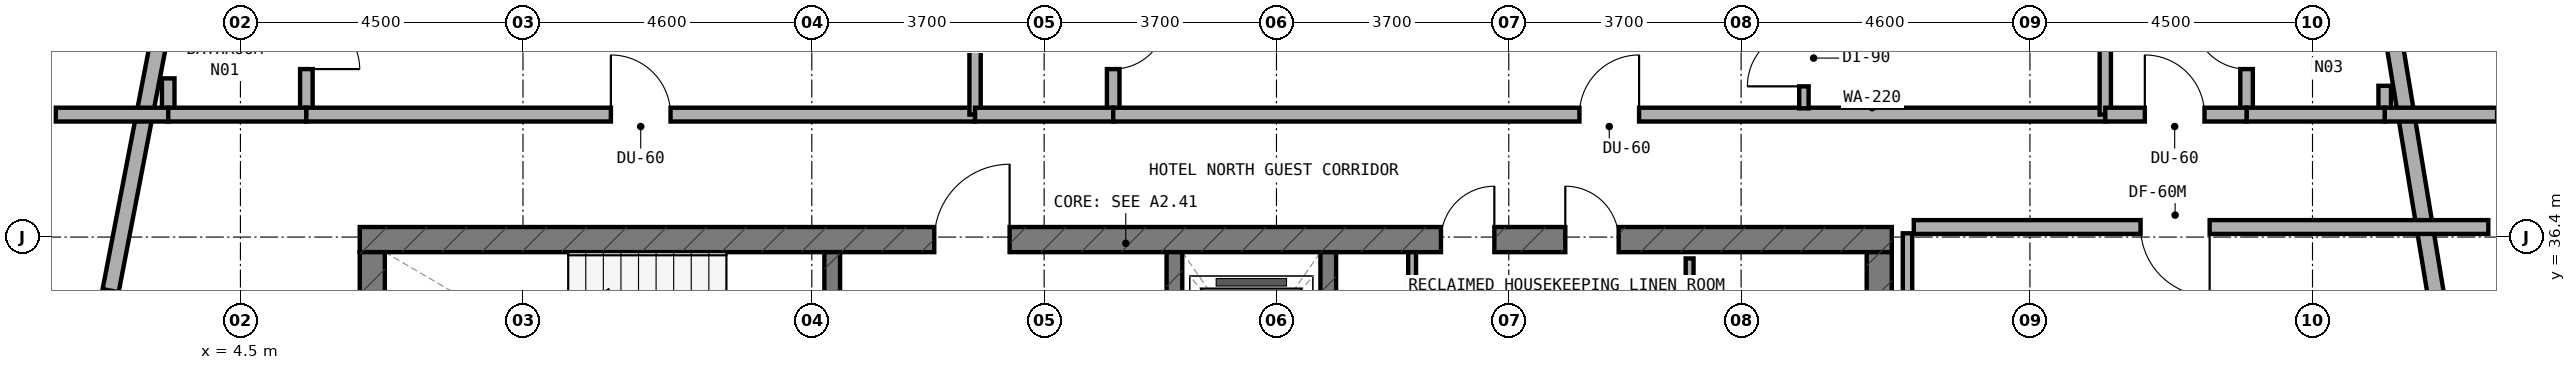
"""IFC4 building model, lengths in metres.
Left out: names, types, materials, properties, quantities, classifications, styles, units other than length and angle.
Written with IfcOpenShell. Run it as: python <this file> out.ifc"""

import sys

from ifc_helpers import new_model, si_unit, direction, frame, frame_2d, origin, place, context, subcontext, project, spatial, rectangle, extrude, element, fill, save


model = new_model("IFC4")
c1 = context("Model", 3, precision=1e-05, world=origin(), true_north=direction((0.0, 1.0)))
c2 = subcontext(c1, "Body", "Model", "MODEL_VIEW")
j1 = project(units=[si_unit("LENGTHUNIT", "METRE"), si_unit("PLANEANGLEUNIT", "RADIAN")], contexts=[c1])
p1 = place(None, origin())
s1 = spatial("IfcSite", under=j1, at=p1, CompositionType="ELEMENT")
p2 = place(p1, origin())
s2 = spatial("IfcBuilding", under=s1, at=p2, CompositionType="ELEMENT")
p3 = place(p2, frame((0.0, 0.0, 181.1)))
s3 = spatial("IfcBuildingStorey", under=s2, at=p3, CompositionType="ELEMENT", Elevation=181.1)
p4 = place(p3, frame((6.4, 36.36, 0.0), z_axis=(0.0, 0.0, 1.0), x_axis=(1.0, 0.0, 0.0)))
e1 = element("IfcWall", 1, at=p4, inside=s3, PredefinedType="SHEAR", context=c2, shape_type="SweptSolid", body=[
    extrude(rectangle(XDim=24.4, YDim=0.4, at=frame_2d((12.2, 0.0))), origin(), (0.0, 0.0, 1.0), 3.6),
])
p5 = place(p4, frame((9.15, 0.0, 0.0)))
e2 = element("IfcOpeningElement", 2, at=p5, cuts=e1, PredefinedType="OPENING", context=c2, shape_type="SweptSolid", body=[
    extrude(rectangle(XDim=1.2, YDim=2.15, at=frame_2d((0.6, 1.075))), frame((0.0, 0.21, 0.0), z_axis=(0.0, -1.0, 0.0), x_axis=(1.0, 0.0, 0.0)), (0.0, 0.0, 1.0), 0.42),
])
p6 = place(p4, frame((19.2, 0.0, 0.0)))
e3 = element("IfcOpeningElement", 3, at=p6, cuts=e1, PredefinedType="OPENING", context=c2, shape_type="SweptSolid", body=[
    extrude(rectangle(XDim=0.85, YDim=2.1, at=frame_2d((0.425, 1.05))), frame((0.0, 0.21, 0.0), z_axis=(0.0, -1.0, 0.0), x_axis=(1.0, 0.0, 0.0)), (0.0, 0.0, 1.0), 0.42),
])
p7 = place(p4, frame((17.22, 0.0, 0.0)))
e4 = element("IfcOpeningElement", 4, at=p7, cuts=e1, PredefinedType="OPENING", context=c2, shape_type="SweptSolid", body=[
    extrude(rectangle(XDim=0.85, YDim=2.1, at=frame_2d((0.425, 1.05))), frame((0.0, 0.21, 0.0), z_axis=(0.0, -1.0, 0.0), x_axis=(1.0, 0.0, 0.0)), (0.0, 0.0, 1.0), 0.42),
])
for number, where, z_axis, x_axis in (
    (5, (6.6, 33.0, 0.0), (0.0, 0.0, 1.0), (0.0, 1.0, 0.0)),
    (6, (30.6, 33.0, 0.0), (0.0, 0.0, 1.0), (0.0, 1.0, 0.0)),
):
    element("IfcWall", number, at=place(p3, frame(where, z_axis=z_axis, x_axis=x_axis)), inside=s3, PredefinedType="SHEAR", context=c2, shape_type="SweptSolid", body=[
        extrude(rectangle(XDim=3.16, YDim=0.4, at=frame_2d((1.58, 0.0))), origin(), (0.0, 0.0, 1.0), 3.6),
    ])
p8 = place(p3, frame((13.925, 33.0, 0.0), z_axis=(0.0, 0.0, 1.0), x_axis=(0.0, 1.0, 0.0)))
e7 = element("IfcWall", 7, at=p8, inside=s3, PredefinedType="STANDARD", context=c2, shape_type="SweptSolid", body=[
    extrude(rectangle(XDim=3.16, YDim=0.25, at=frame_2d((1.58, 0.0))), origin(), (0.0, 0.0, 1.0), 3.32),
])
p9 = place(p8, frame((0.98, 0.0, 0.0)))
e8 = element("IfcOpeningElement", 8, at=p9, cuts=e7, PredefinedType="OPENING", context=c2, shape_type="SweptSolid", body=[
    extrude(rectangle(XDim=1.1, YDim=2.15, at=frame_2d((0.55, 1.075))), frame((0.0, 0.135, 0.0), z_axis=(0.0, -1.0, 0.0), x_axis=(1.0, 0.0, 0.0)), (0.0, 0.0, 1.0), 0.27),
])
p10 = place(p3, frame((19.375, 33.0, 0.0), z_axis=(0.0, 0.0, 1.0), x_axis=(0.0, 1.0, 0.0)))
e9 = element("IfcWall", 9, at=p10, inside=s3, PredefinedType="STANDARD", context=c2, shape_type="SweptSolid", body=[
    extrude(rectangle(XDim=3.16, YDim=0.25, at=frame_2d((1.58, 0.0))), origin(), (0.0, 0.0, 1.0), 3.32),
])
p11 = place(p10, frame((0.98, 0.0, 0.0)))
e10 = element("IfcOpeningElement", 10, at=p11, cuts=e9, PredefinedType="OPENING", context=c2, shape_type="SweptSolid", body=[
    extrude(rectangle(XDim=1.1, YDim=2.15, at=frame_2d((0.55, 1.075))), frame((0.0, 0.135, 0.0), z_axis=(0.0, -1.0, 0.0), x_axis=(1.0, 0.0, 0.0)), (0.0, 0.0, 1.0), 0.27),
])
p12 = place(p3, frame((21.825, 33.0, 0.0), z_axis=(0.0, 0.0, 1.0), x_axis=(0.0, 1.0, 0.0)))
e11 = element("IfcWall", 11, at=p12, inside=s3, PredefinedType="STANDARD", context=c2, shape_type="SweptSolid", body=[
    extrude(rectangle(XDim=3.16, YDim=0.25, at=frame_2d((1.58, 0.0))), origin(), (0.0, 0.0, 1.0), 3.32),
])
p13 = place(p3, frame((40.476, 29.354, 0.0), z_axis=(0.0, 0.0, 1.0), x_axis=(-0.162811037825, 0.986657268742, 0.0)))
e12 = element("IfcWall", 12, at=p13, inside=s3, PredefinedType="STANDARD", context=c2, shape_type="SweptSolid", body=[
    extrude(rectangle(XDim=10.473, YDim=0.26, at=frame_2d((5.236, 0.0))), origin(), (0.0, 0.0, 1.0), 3.32),
])
p14 = place(p13, frame((2.545, 0.0, 0.85)))
e13 = element("IfcOpeningElement", 13, at=p14, cuts=e12, PredefinedType="OPENING", context=c2, shape_type="SweptSolid", body=[
    extrude(rectangle(XDim=2.1, YDim=1.5, at=frame_2d((1.05, 0.75))), frame((0.0, 0.14, 0.0), z_axis=(0.0, -1.0, 0.0), x_axis=(1.0, 0.0, 0.0)), (0.0, 0.0, 1.0), 0.28),
])
p15 = place(p3, frame((3.23, 39.683, 0.0), z_axis=(0.0, 0.0, 1.0), x_axis=(-0.189254809039, -0.98192801022, 0.0)))
e14 = element("IfcWall", 14, at=p15, inside=s3, PredefinedType="STANDARD", context=c2, shape_type="SweptSolid", body=[
    extrude(rectangle(XDim=9.046, YDim=0.26, at=frame_2d((4.523, 0.0))), origin(), (0.0, 0.0, 1.0), 3.32),
])
p16 = place(p15, frame((4.212, 0.0, 0.85)))
e15 = element("IfcOpeningElement", 15, at=p16, cuts=e14, PredefinedType="OPENING", context=c2, shape_type="SweptSolid", body=[
    extrude(rectangle(XDim=2.1, YDim=1.5, at=frame_2d((1.05, 0.75))), frame((0.0, 0.14, 0.0), z_axis=(0.0, -1.0, 0.0), x_axis=(1.0, 0.0, 0.0)), (0.0, 0.0, 1.0), 0.28),
])
p17 = place(p3, frame((27.58, 33.1, 0.0), z_axis=(0.0, 0.0, 1.0), x_axis=(0.0, 1.0, 0.0)))
e16 = element("IfcWall", 16, at=p17, inside=s3, PredefinedType="PARTITIONING", context=c2, shape_type="SweptSolid", body=[
    extrude(rectangle(XDim=2.96, YDim=0.125, at=frame_2d((1.48, 0.0))), origin(), (0.0, 0.0, 1.0), 2.995),
])
p18 = place(p17, frame((1.055, 0.0, 0.0)))
e17 = element("IfcOpeningElement", 17, at=p18, cuts=e16, PredefinedType="OPENING", context=c2, shape_type="SweptSolid", body=[
    extrude(rectangle(XDim=0.85, YDim=2.1, at=frame_2d((0.425, 1.05))), frame((0.0, 0.073, 0.0), z_axis=(0.0, -1.0, 0.0), x_axis=(1.0, 0.0, 0.0)), (0.0, 0.0, 1.0), 0.145),
])
p19 = place(p3, frame((23.16, 34.82, 0.0), z_axis=(0.0, 0.0, 1.0), x_axis=(0.0, 1.0, 0.0)))
e18 = element("IfcWall", 18, at=p19, inside=s3, PredefinedType="PARTITIONING", context=c2, shape_type="SweptSolid", body=[
    extrude(rectangle(XDim=1.34, YDim=0.125, at=frame_2d((0.67, 0.0))), origin(), (0.0, 0.0, 1.0), 3.32),
])
p20 = place(p3, frame((5.55, 38.45, 0.0), z_axis=(0.0, 0.0, 1.0), x_axis=(0.0, 1.0, 0.0)))
e19 = element("IfcWall", 19, at=p20, inside=s3, PredefinedType="PLUMBINGWALL", context=c2, shape_type="SweptSolid", body=[
    extrude(rectangle(XDim=2.1, YDim=0.2, at=frame_2d((1.05, 0.0))), origin(), (0.0, 0.0, 1.0), 3.32),
])
p21 = place(p20, frame((0.625, 0.0, 0.0)))
e20 = element("IfcOpeningElement", 20, at=p21, cuts=e19, PredefinedType="OPENING", context=c2, shape_type="SweptSolid", body=[
    extrude(rectangle(XDim=0.85, YDim=2.1, at=frame_2d((0.425, 1.05))), frame((0.0, 0.11, 0.0), z_axis=(0.0, -1.0, 0.0), x_axis=(1.0, 0.0, 0.0)), (0.0, 0.0, 1.0), 0.22),
])
p22 = place(p3, frame((3.35, 38.35, 0.0), z_axis=(0.0, 0.0, 1.0), x_axis=(0.0, 1.0, 0.0)))
e21 = element("IfcWall", 21, at=p22, inside=s3, PredefinedType="PLUMBINGWALL", context=c2, shape_type="SweptSolid", body=[
    extrude(rectangle(XDim=0.577, YDim=0.2, at=frame_2d((0.289, 0.0))), origin(), (0.0, 0.0, 1.0), 3.32),
])
p23 = place(p3, frame((1.56, 38.35, 0.0), z_axis=(0.0, 0.0, 1.0), x_axis=(1.0, 0.0, 0.0)))
e22 = element("IfcWall", 22, at=p23, inside=s3, PredefinedType="SOLIDWALL", context=c2, shape_type="SweptSolid", body=[
    extrude(rectangle(XDim=1.79, YDim=0.22, at=frame_2d((0.895, 0.0))), origin(), (0.0, 0.0, 1.0), 3.32),
])
p24 = place(p3, frame((3.35, 38.35, 0.0), z_axis=(0.0, 0.0, 1.0), x_axis=(1.0, 0.0, 0.0)))
e23 = element("IfcWall", 23, at=p24, inside=s3, PredefinedType="SOLIDWALL", context=c2, shape_type="SweptSolid", body=[
    extrude(rectangle(XDim=2.2, YDim=0.22, at=frame_2d((1.1, 0.0))), origin(), (0.0, 0.0, 1.0), 3.32),
])
p25 = place(p3, frame((5.55, 38.35, 0.0), z_axis=(0.0, 0.0, 1.0), x_axis=(1.0, 0.0, 0.0)))
e24 = element("IfcWall", 24, at=p25, inside=s3, PredefinedType="SOLIDWALL", context=c2, shape_type="SweptSolid", body=[
    extrude(rectangle(XDim=10.65, YDim=0.22, at=frame_2d((5.325, 0.0))), origin(), (0.0, 0.0, 1.0), 2.995),
])
p26 = place(p25, frame((4.85, 0.0, 0.0)))
e25 = element("IfcOpeningElement", 25, at=p26, cuts=e24, PredefinedType="OPENING", context=c2, shape_type="SweptSolid", body=[
    extrude(rectangle(XDim=0.95, YDim=2.1, at=frame_2d((0.475, 1.05))), frame((0.0, 0.12, 0.0), z_axis=(0.0, -1.0, 0.0), x_axis=(1.0, 0.0, 0.0)), (0.0, 0.0, 1.0), 0.24),
])
p27 = place(p3, frame((16.2, 38.35, 0.0), z_axis=(0.0, 0.0, 1.0), x_axis=(0.0, 1.0, 0.0)))
e26 = element("IfcWall", 26, at=p27, inside=s3, PredefinedType="SOLIDWALL", context=c2, shape_type="SweptSolid", body=[
    extrude(rectangle(XDim=6.19, YDim=0.18, at=frame_2d((3.095, 0.0))), origin(), (0.0, 0.0, 1.0), 2.935),
])
p28 = place(p3, frame((18.4, 38.45, 0.0), z_axis=(0.0, 0.0, 1.0), x_axis=(0.0, 1.0, 0.0)))
e27 = element("IfcWall", 27, at=p28, inside=s3, PredefinedType="PLUMBINGWALL", context=c2, shape_type="SweptSolid", body=[
    extrude(rectangle(XDim=2.1, YDim=0.2, at=frame_2d((1.05, 0.0))), origin(), (0.0, 0.0, 1.0), 2.895),
])
p29 = place(p28, frame((0.625, 0.0, 0.0)))
e28 = element("IfcOpeningElement", 28, at=p29, cuts=e27, PredefinedType="OPENING", context=c2, shape_type="SweptSolid", body=[
    extrude(rectangle(XDim=0.85, YDim=2.1, at=frame_2d((0.425, 1.05))), frame((0.0, 0.11, 0.0), z_axis=(0.0, -1.0, 0.0), x_axis=(1.0, 0.0, 0.0)), (0.0, 0.0, 1.0), 0.22),
])
p30 = place(p3, frame((16.2, 38.35, 0.0), z_axis=(0.0, 0.0, 1.0), x_axis=(1.0, 0.0, 0.0)))
e29 = element("IfcWall", 29, at=p30, inside=s3, PredefinedType="SOLIDWALL", context=c2, shape_type="SweptSolid", body=[
    extrude(rectangle(XDim=2.2, YDim=0.22, at=frame_2d((1.1, 0.0))), origin(), (0.0, 0.0, 1.0), 2.995),
])
p31 = place(p3, frame((18.4, 38.35, 0.0), z_axis=(0.0, 0.0, 1.0), x_axis=(1.0, 0.0, 0.0)))
e30 = element("IfcWall", 30, at=p31, inside=s3, PredefinedType="SOLIDWALL", context=c2, shape_type="SweptSolid", body=[
    extrude(rectangle(XDim=15.8, YDim=0.22, at=frame_2d((7.9, 0.0))), origin(), (0.0, 0.0, 1.0), 2.995),
])
p32 = place(p31, frame((7.425, 0.0, 0.0)))
e31 = element("IfcOpeningElement", 31, at=p32, cuts=e30, PredefinedType="OPENING", context=c2, shape_type="SweptSolid", body=[
    extrude(rectangle(XDim=0.95, YDim=2.1, at=frame_2d((0.475, 1.05))), frame((0.0, 0.12, 0.0), z_axis=(0.0, -1.0, 0.0), x_axis=(1.0, 0.0, 0.0)), (0.0, 0.0, 1.0), 0.24),
])
p33 = place(p3, frame((29.4, 38.45, 0.0), z_axis=(0.0, 0.0, 1.0), x_axis=(0.0, 1.0, 0.0)))
e32 = element("IfcWall", 32, at=p33, inside=s3, PredefinedType="PARTITIONING", context=c2, shape_type="SweptSolid", body=[
    extrude(rectangle(XDim=5.503, YDim=0.15, at=frame_2d((2.751, 0.0))), origin(), (0.0, 0.0, 1.0), 2.895),
])
p34 = place(p33, frame((0.35, 0.0, 0.0)))
e33 = element("IfcOpeningElement", 33, at=p34, cuts=e32, PredefinedType="OPENING", context=c2, shape_type="SweptSolid", body=[
    extrude(rectangle(XDim=0.9, YDim=2.1, at=frame_2d((0.45, 1.05))), frame((0.0, 0.085, 0.0), z_axis=(0.0, -1.0, 0.0), x_axis=(1.0, 0.0, 0.0)), (0.0, 0.0, 1.0), 0.17),
])
p35 = place(p3, frame((34.2, 38.35, 0.0), z_axis=(0.0, 0.0, 1.0), x_axis=(0.0, 1.0, 0.0)))
e34 = element("IfcWall", 34, at=p35, inside=s3, PredefinedType="SOLIDWALL", context=c2, shape_type="SweptSolid", body=[
    extrude(rectangle(XDim=4.778, YDim=0.18, at=frame_2d((2.389, 0.0))), origin(), (0.0, 0.0, 1.0), 2.935),
])
p36 = place(p3, frame((36.45, 38.45, 0.0), z_axis=(0.0, 0.0, 1.0), x_axis=(0.0, 1.0, 0.0)))
e35 = element("IfcWall", 35, at=p36, inside=s3, PredefinedType="PLUMBINGWALL", context=c2, shape_type="SweptSolid", body=[
    extrude(rectangle(XDim=2.1, YDim=0.2, at=frame_2d((1.05, 0.0))), origin(), (0.0, 0.0, 1.0), 3.32),
])
p37 = place(p36, frame((0.625, 0.0, 0.0)))
e36 = element("IfcOpeningElement", 36, at=p37, cuts=e35, PredefinedType="OPENING", context=c2, shape_type="SweptSolid", body=[
    extrude(rectangle(XDim=0.85, YDim=2.1, at=frame_2d((0.425, 1.05))), frame((0.0, 0.11, 0.0), z_axis=(0.0, -1.0, 0.0), x_axis=(1.0, 0.0, 0.0)), (0.0, 0.0, 1.0), 0.22),
])
p38 = place(p3, frame((38.65, 38.35, 0.0), z_axis=(0.0, 0.0, 1.0), x_axis=(0.0, 1.0, 0.0)))
e37 = element("IfcWall", 37, at=p38, inside=s3, PredefinedType="PLUMBINGWALL", context=c2, shape_type="SweptSolid", body=[
    extrude(rectangle(XDim=0.459, YDim=0.2, at=frame_2d((0.229, 0.0))), origin(), (0.0, 0.0, 1.0), 3.32),
])
p39 = place(p3, frame((38.65, 38.35, 0.0), z_axis=(0.0, 0.0, 1.0), x_axis=(1.0, 0.0, 0.0)))
e38 = element("IfcWall", 38, at=p39, inside=s3, PredefinedType="SOLIDWALL", context=c2, shape_type="SweptSolid", body=[
    extrude(rectangle(XDim=1.79, YDim=0.22, at=frame_2d((0.895, 0.0))), origin(), (0.0, 0.0, 1.0), 3.32),
])
p40 = place(p3, frame((36.45, 38.35, 0.0), z_axis=(0.0, 0.0, 1.0), x_axis=(1.0, 0.0, 0.0)))
e39 = element("IfcWall", 39, at=p40, inside=s3, PredefinedType="SOLIDWALL", context=c2, shape_type="SweptSolid", body=[
    extrude(rectangle(XDim=2.2, YDim=0.22, at=frame_2d((1.1, 0.0))), origin(), (0.0, 0.0, 1.0), 3.32),
])
p41 = place(p3, frame((34.2, 38.35, 0.0), z_axis=(0.0, 0.0, 1.0), x_axis=(1.0, 0.0, 0.0)))
e40 = element("IfcWall", 40, at=p41, inside=s3, PredefinedType="SOLIDWALL", context=c2, shape_type="SweptSolid", body=[
    extrude(rectangle(XDim=2.25, YDim=0.22, at=frame_2d((1.125, 0.0))), origin(), (0.0, 0.0, 1.0), 2.935),
])
p42 = place(p41, frame((0.63, 0.0, 0.0)))
e41 = element("IfcOpeningElement", 41, at=p42, cuts=e40, PredefinedType="OPENING", context=c2, shape_type="SweptSolid", body=[
    extrude(rectangle(XDim=0.95, YDim=2.1, at=frame_2d((0.475, 1.05))), frame((0.0, 0.12, 0.0), z_axis=(0.0, -1.0, 0.0), x_axis=(1.0, 0.0, 0.0)), (0.0, 0.0, 1.0), 0.24),
])
p43 = place(p3, frame((31.05, 29.8, 0.0), z_axis=(0.0, 0.0, 1.0), x_axis=(0.0, 1.0, 0.0)))
e42 = element("IfcWall", 42, at=p43, inside=s3, PredefinedType="PARTITIONING", context=c2, shape_type="SweptSolid", body=[
    extrude(rectangle(XDim=6.66, YDim=0.15, at=frame_2d((3.33, 0.0))), origin(), (0.0, 0.0, 1.0), 2.995),
])
p44 = place(p3, frame((31.15, 36.56, 0.0), z_axis=(0.0, 0.0, 1.0), x_axis=(1.0, 0.0, 0.0)))
e43 = element("IfcWall", 43, at=p44, inside=s3, PredefinedType="SOLIDWALL", context=c2, shape_type="SweptSolid", body=[
    extrude(rectangle(XDim=9.15, YDim=0.22, at=frame_2d((4.575, 0.0))), origin(), (0.0, 0.0, 1.0), 2.935),
])
p45 = place(p44, frame((3.612, 0.0, 0.0)))
e44 = element("IfcOpeningElement", 44, at=p45, cuts=e43, PredefinedType="OPENING", context=c2, shape_type="SweptSolid", body=[
    extrude(rectangle(XDim=1.1, YDim=2.1, at=frame_2d((0.55, 1.05))), frame((0.0, 0.12, 0.0), z_axis=(0.0, -1.0, 0.0), x_axis=(1.0, 0.0, 0.0)), (0.0, 0.0, 1.0), 0.24),
])
p46 = place(p5, origin())
e45 = element("IfcDoor", 45, at=p46, inside=s3, OperationType="SINGLE_SWING_RIGHT", PredefinedType="DOOR", context=c2, shape_type="SweptSolid", body=[
    extrude(rectangle(XDim=1.2, YDim=2.15, at=frame_2d((0.6, 1.075))), frame((0.0, 0.025, 0.0), z_axis=(0.0, -1.0, 0.0), x_axis=(1.0, 0.0, 0.0)), (0.0, 0.0, 1.0), 0.05),
])
fill(e2, e45)
p47 = place(p6, origin())
e46 = element("IfcDoor", 46, at=p47, inside=s3, OperationType="SINGLE_SWING_LEFT", PredefinedType="DOOR", context=c2, shape_type="SweptSolid", body=[
    extrude(rectangle(XDim=0.85, YDim=2.1, at=frame_2d((0.425, 1.05))), frame((0.0, 0.025, 0.0), z_axis=(0.0, -1.0, 0.0), x_axis=(1.0, 0.0, 0.0)), (0.0, 0.0, 1.0), 0.05),
])
fill(e3, e46)
p48 = place(p7, origin())
e47 = element("IfcDoor", 47, at=p48, inside=s3, OperationType="SINGLE_SWING_RIGHT", PredefinedType="DOOR", context=c2, shape_type="SweptSolid", body=[
    extrude(rectangle(XDim=0.85, YDim=2.1, at=frame_2d((0.425, 1.05))), frame((0.0, 0.025, 0.0), z_axis=(0.0, -1.0, 0.0), x_axis=(1.0, 0.0, 0.0)), (0.0, 0.0, 1.0), 0.05),
])
fill(e4, e47)
p49 = place(p21, frame((0.85, 0.0, 0.0), z_axis=(0.0, 0.0, 1.0), x_axis=(-1.0, 0.0, 0.0)))
e48 = element("IfcDoor", 48, at=p49, inside=s3, OperationType="SINGLE_SWING_RIGHT", PredefinedType="DOOR", context=c2, shape_type="SweptSolid", body=[
    extrude(rectangle(XDim=0.85, YDim=2.1, at=frame_2d((0.425, 1.05))), frame((0.0, 0.025, 0.0), z_axis=(0.0, -1.0, 0.0), x_axis=(1.0, 0.0, 0.0)), (0.0, 0.0, 1.0), 0.05),
])
fill(e20, e48)
p50 = place(p26, origin())
e49 = element("IfcDoor", 49, at=p50, inside=s3, OperationType="SINGLE_SWING_LEFT", PredefinedType="DOOR", context=c2, shape_type="SweptSolid", body=[
    extrude(rectangle(XDim=0.95, YDim=2.1, at=frame_2d((0.475, 1.05))), frame((0.0, 0.025, 0.0), z_axis=(0.0, -1.0, 0.0), x_axis=(1.0, 0.0, 0.0)), (0.0, 0.0, 1.0), 0.05),
])
fill(e25, e49)
p51 = place(p29, frame((0.85, 0.0, 0.0), z_axis=(0.0, 0.0, 1.0), x_axis=(-1.0, 0.0, 0.0)))
e50 = element("IfcDoor", 50, at=p51, inside=s3, OperationType="SINGLE_SWING_LEFT", PredefinedType="DOOR", context=c2, shape_type="SweptSolid", body=[
    extrude(rectangle(XDim=0.85, YDim=2.1, at=frame_2d((0.425, 1.05))), frame((0.0, 0.025, 0.0), z_axis=(0.0, -1.0, 0.0), x_axis=(1.0, 0.0, 0.0)), (0.0, 0.0, 1.0), 0.05),
])
fill(e28, e50)
p52 = place(p32, origin())
e51 = element("IfcDoor", 51, at=p52, inside=s3, OperationType="SINGLE_SWING_RIGHT", PredefinedType="DOOR", context=c2, shape_type="SweptSolid", body=[
    extrude(rectangle(XDim=0.95, YDim=2.1, at=frame_2d((0.475, 1.05))), frame((0.0, 0.025, 0.0), z_axis=(0.0, -1.0, 0.0), x_axis=(1.0, 0.0, 0.0)), (0.0, 0.0, 1.0), 0.05),
])
fill(e31, e51)
p53 = place(p34, origin())
e52 = element("IfcDoor", 52, at=p53, inside=s3, OperationType="SINGLE_SWING_LEFT", PredefinedType="DOOR", context=c2, shape_type="SweptSolid", body=[
    extrude(rectangle(XDim=0.9, YDim=2.1, at=frame_2d((0.45, 1.05))), frame((0.0, 0.025, 0.0), z_axis=(0.0, -1.0, 0.0), x_axis=(1.0, 0.0, 0.0)), (0.0, 0.0, 1.0), 0.05),
])
fill(e33, e52)
p54 = place(p37, origin())
e53 = element("IfcDoor", 53, at=p54, inside=s3, OperationType="SINGLE_SWING_RIGHT", PredefinedType="DOOR", context=c2, shape_type="SweptSolid", body=[
    extrude(rectangle(XDim=0.85, YDim=2.1, at=frame_2d((0.425, 1.05))), frame((0.0, 0.025, 0.0), z_axis=(0.0, -1.0, 0.0), x_axis=(1.0, 0.0, 0.0)), (0.0, 0.0, 1.0), 0.05),
])
fill(e36, e53)
p55 = place(p42, origin())
e54 = element("IfcDoor", 54, at=p55, inside=s3, OperationType="SINGLE_SWING_LEFT", PredefinedType="DOOR", context=c2, shape_type="SweptSolid", body=[
    extrude(rectangle(XDim=0.95, YDim=2.1, at=frame_2d((0.475, 1.05))), frame((0.0, 0.025, 0.0), z_axis=(0.0, -1.0, 0.0), x_axis=(1.0, 0.0, 0.0)), (0.0, 0.0, 1.0), 0.05),
])
fill(e41, e54)
p56 = place(p45, frame((1.1, 0.0, 0.0), z_axis=(0.0, 0.0, 1.0), x_axis=(-1.0, 0.0, 0.0)))
e55 = element("IfcDoor", 55, at=p56, inside=s3, OperationType="SINGLE_SWING_LEFT", PredefinedType="DOOR", context=c2, shape_type="SweptSolid", body=[
    extrude(rectangle(XDim=1.1, YDim=2.1, at=frame_2d((0.55, 1.05))), frame((0.0, 0.025, 0.0), z_axis=(0.0, -1.0, 0.0), x_axis=(1.0, 0.0, 0.0)), (0.0, 0.0, 1.0), 0.05),
])
fill(e44, e55)
save(model, sys.argv[1])
